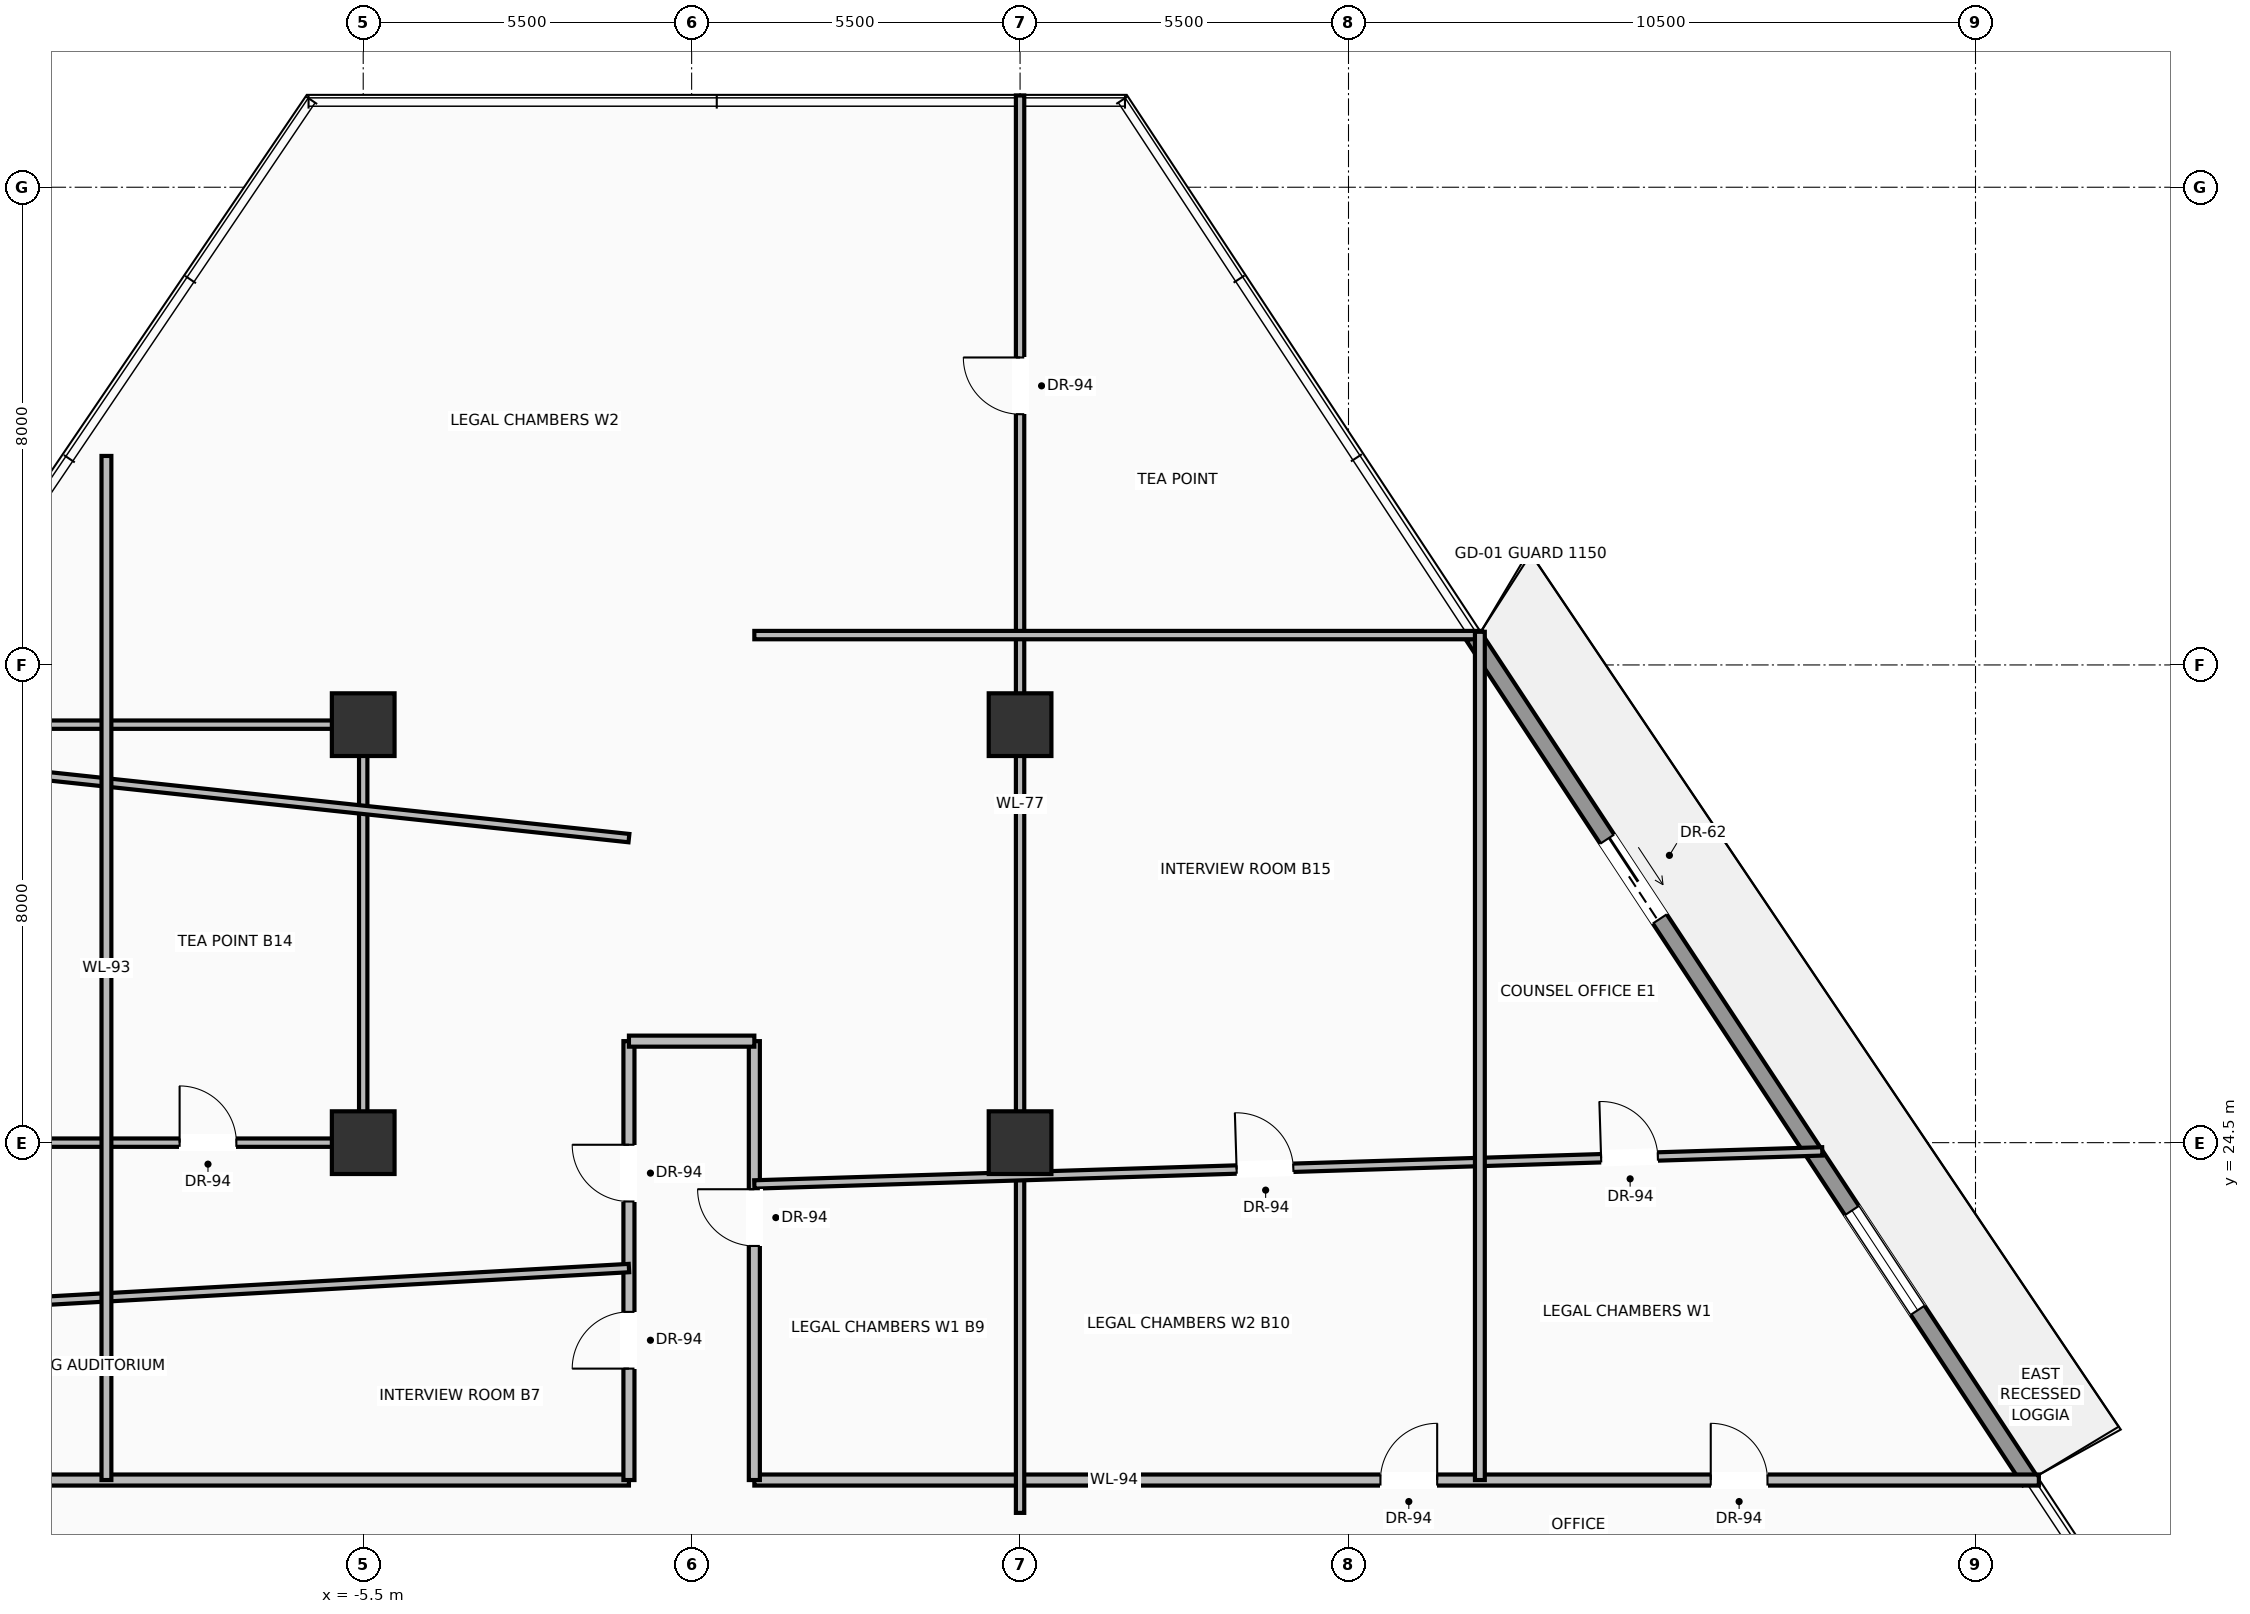
"""IFC4 building model, lengths in metres.
Left out: names, types, materials, properties, quantities, classifications, styles, units other than length and angle.
Written with IfcOpenShell. Run it as: python <this file> out.ifc"""

import sys

from ifc_helpers import new_model, si_unit, direction, frame, frame_2d, origin, origin_2d, place, context, subcontext, project, spatial, rectangle, extrude, source, transform, mapped, element, fill, save


model = new_model("IFC4")
c1 = context("Model", 3, precision=1e-05, world=origin(), true_north=direction((0.0, 1.0)))
c2 = subcontext(c1, "Body", "Model", "MODEL_VIEW")
j1 = project(units=[si_unit("LENGTHUNIT", "METRE"), si_unit("PLANEANGLEUNIT", "RADIAN")], contexts=[c1])
p1 = place(None, origin())
s1 = spatial("IfcSite", under=j1, at=p1, CompositionType="ELEMENT")
p2 = place(p1, origin())
s2 = spatial("IfcBuilding", under=s1, at=p2, CompositionType="ELEMENT")
p3 = place(p2, frame((0.0, 0.0, 68.2)))
s3 = spatial("IfcBuildingStorey", under=s2, at=p3, CompositionType="ELEMENT", Elevation=68.2)
m1 = source(origin(), c2, "Body", "SweptSolid", [
    extrude(rectangle(XDim=1.05, YDim=1.05, at=origin_2d()), origin(), (0.0, 0.0, 1.0), 3.7),
])
for number, where, z_axis, x_axis in (
    (1, (-5.5, 24.5, 0.0), (0.0, 0.0, 1.0), (1.0, 0.0, 0.0)),
    (2, (5.5, 24.5, 0.0), (0.0, 0.0, 1.0), (1.0, 0.0, 0.0)),
    (3, (-5.5, 31.5, 0.0), (0.0, 0.0, 1.0), (1.0, 0.0, 0.0)),
    (4, (5.5, 31.5, 0.0), (0.0, 0.0, 1.0), (1.0, 0.0, 0.0)),
):
    element("IfcColumn", number, at=place(p3, frame(where, z_axis=z_axis, x_axis=x_axis)), inside=s3, PredefinedType="COLUMN", context=c2, shape_type="MappedRepresentation", body=[
        mapped(m1, transform((0.0, 0.0, 0.0), scale=1.0)),
    ])
p4 = place(p3, frame((13.097, 32.975, 0.0), z_axis=(0.0, 0.0, 1.0), x_axis=(0.550258972905, -0.834994049522, 0.0)))
e5 = element("IfcWall", 5, at=p4, inside=s3, PredefinedType="SOLIDWALL", context=c2, shape_type="SweptSolid", body=[
    extrude(rectangle(XDim=16.927, YDim=0.28, at=frame_2d((8.464, 0.0))), origin(), (0.0, 0.0, 1.0), 2.98),
])
p5 = place(p4, frame((4.062, 0.0, 0.0)))
e6 = element("IfcOpeningElement", 6, at=p5, cuts=e5, PredefinedType="OPENING", context=c2, shape_type="SweptSolid", body=[
    extrude(rectangle(XDim=1.6, YDim=2.35, at=frame_2d((0.8, 1.175))), frame((0.0, 0.15, 0.0), z_axis=(0.0, -1.0, 0.0), x_axis=(1.0, 0.0, 0.0)), (0.0, 0.0, 1.0), 0.3),
])
p6 = place(p4, frame((11.511, 0.0, 0.9)))
e7 = element("IfcOpeningElement", 7, at=p6, cuts=e5, PredefinedType="OPENING", context=c2, shape_type="SweptSolid", body=[
    extrude(rectangle(XDim=2.0, YDim=1.85, at=frame_2d((1.0, 0.925))), frame((0.0, 0.15, 0.0), z_axis=(0.0, -1.0, 0.0), x_axis=(1.0, 0.0, 0.0)), (0.0, 0.0, 1.0), 0.3),
])
p7 = place(p3, frame((-22.184, 18.85, 0.0), z_axis=(0.0, 0.0, 1.0), x_axis=(1.0, 0.0, 0.0)))
e8 = element("IfcWall", 8, at=p7, inside=s3, PredefinedType="PARTITIONING", context=c2, shape_type="SweptSolid", body=[
    extrude(rectangle(XDim=21.134, YDim=0.185, at=frame_2d((10.567, 0.0))), origin(), (0.0, 0.0, 1.0), 2.697),
])
p8 = place(p7, frame((9.069, 0.0, 0.0)))
e9 = element("IfcOpeningElement", 9, at=p8, cuts=e8, PredefinedType="OPENING", context=c2, shape_type="SweptSolid", body=[
    extrude(rectangle(XDim=0.95, YDim=2.2, at=frame_2d((0.475, 1.1))), frame((0.0, 0.103, 0.0), z_axis=(0.0, -1.0, 0.0), x_axis=(1.0, 0.0, 0.0)), (0.0, 0.0, 1.0), 0.205),
])
p9 = place(p3, frame((1.05, 18.85, 0.0), z_axis=(0.0, 0.0, 1.0), x_axis=(1.0, 0.0, 0.0)))
e10 = element("IfcWall", 10, at=p9, inside=s3, PredefinedType="PARTITIONING", context=c2, shape_type="SweptSolid", body=[
    extrude(rectangle(XDim=21.511, YDim=0.185, at=frame_2d((10.756, 0.0))), origin(), (0.0, 0.0, 1.0), 2.697),
])
p10 = place(p9, frame((10.485, 0.0, 0.0)))
e11 = element("IfcOpeningElement", 11, at=p10, cuts=e10, PredefinedType="OPENING", context=c2, shape_type="SweptSolid", body=[
    extrude(rectangle(XDim=0.95, YDim=2.2, at=frame_2d((0.475, 1.1))), frame((0.0, 0.103, 0.0), z_axis=(0.0, -1.0, 0.0), x_axis=(1.0, 0.0, 0.0)), (0.0, 0.0, 1.0), 0.205),
])
p11 = place(p9, frame((16.016, 0.0, 0.0)))
e12 = element("IfcOpeningElement", 12, at=p11, cuts=e10, PredefinedType="OPENING", context=c2, shape_type="SweptSolid", body=[
    extrude(rectangle(XDim=0.95, YDim=2.2, at=frame_2d((0.475, 1.1))), frame((0.0, 0.103, 0.0), z_axis=(0.0, -1.0, 0.0), x_axis=(1.0, 0.0, 0.0)), (0.0, 0.0, 1.0), 0.205),
])
p12 = place(p3, frame((-1.05, 18.85, 0.0), z_axis=(0.0, 0.0, 1.0), x_axis=(0.0, 1.0, 0.0)))
e13 = element("IfcWall", 13, at=p12, inside=s3, PredefinedType="PARTITIONING", context=c2, shape_type="SweptSolid", body=[
    extrude(rectangle(XDim=7.35, YDim=0.185, at=frame_2d((3.675, 0.0))), origin(), (0.0, 0.0, 1.0), 2.697),
])
p13 = place(p12, frame((1.866, 0.0, 0.0)))
e14 = element("IfcOpeningElement", 14, at=p13, cuts=e13, PredefinedType="OPENING", context=c2, shape_type="SweptSolid", body=[
    extrude(rectangle(XDim=0.95, YDim=2.2, at=frame_2d((0.475, 1.1))), frame((0.0, 0.103, 0.0), z_axis=(0.0, -1.0, 0.0), x_axis=(1.0, 0.0, 0.0)), (0.0, 0.0, 1.0), 0.205),
])
p14 = place(p12, frame((4.665, 0.0, 0.0)))
e15 = element("IfcOpeningElement", 15, at=p14, cuts=e13, PredefinedType="OPENING", context=c2, shape_type="SweptSolid", body=[
    extrude(rectangle(XDim=0.95, YDim=2.2, at=frame_2d((0.475, 1.1))), frame((0.0, 0.103, 0.0), z_axis=(0.0, -1.0, 0.0), x_axis=(1.0, 0.0, 0.0)), (0.0, 0.0, 1.0), 0.205),
])
p15 = place(p3, frame((1.05, 18.85, 0.0), z_axis=(0.0, 0.0, 1.0), x_axis=(0.0, 1.0, 0.0)))
e16 = element("IfcWall", 16, at=p15, inside=s3, PredefinedType="PARTITIONING", context=c2, shape_type="SweptSolid", body=[
    extrude(rectangle(XDim=7.35, YDim=0.185, at=frame_2d((3.675, 0.0))), origin(), (0.0, 0.0, 1.0), 2.697),
])
p16 = place(p15, frame((3.92, 0.0, 0.0)))
e17 = element("IfcOpeningElement", 17, at=p16, cuts=e16, PredefinedType="OPENING", context=c2, shape_type="SweptSolid", body=[
    extrude(rectangle(XDim=0.95, YDim=2.2, at=frame_2d((0.475, 1.1))), frame((0.0, 0.103, 0.0), z_axis=(0.0, -1.0, 0.0), x_axis=(1.0, 0.0, 0.0)), (0.0, 0.0, 1.0), 0.205),
])
p17 = place(p3, frame((-1.05, 26.2, 0.0), z_axis=(0.0, 0.0, 1.0), x_axis=(1.0, 0.0, 0.0)))
e18 = element("IfcWall", 18, at=p17, inside=s3, PredefinedType="PARTITIONING", context=c2, shape_type="SweptSolid", body=[
    extrude(rectangle(XDim=2.1, YDim=0.185, at=frame_2d((1.05, 0.0))), origin(), (0.0, 0.0, 1.0), 3.392),
])
p18 = place(p3, frame((5.5, 18.3, 0.0), z_axis=(0.0, 0.0, 1.0), x_axis=(0.0, 1.0, 0.0)))
e19 = element("IfcWall", 19, at=p18, inside=s3, PredefinedType="PARTITIONING", context=c2, shape_type="SweptSolid", body=[
    extrude(rectangle(XDim=23.737, YDim=0.14, at=frame_2d((11.868, 0.0))), origin(), (0.0, 0.0, 1.0), 2.697),
])
p19 = place(p18, frame((18.399, 0.0, 0.0)))
e20 = element("IfcOpeningElement", 20, at=p19, cuts=e19, PredefinedType="OPENING", context=c2, shape_type="SweptSolid", body=[
    extrude(rectangle(XDim=0.95, YDim=2.2, at=frame_2d((0.475, 1.1))), frame((0.0, 0.08, 0.0), z_axis=(0.0, -1.0, 0.0), x_axis=(1.0, 0.0, 0.0)), (0.0, 0.0, 1.0), 0.16),
])
p20 = place(p3, frame((-18.347, 24.5, 0.0), z_axis=(0.0, 0.0, 1.0), x_axis=(1.0, 0.0, 0.0)))
e21 = element("IfcWall", 21, at=p20, inside=s3, PredefinedType="PARTITIONING", context=c2, shape_type="SweptSolid", body=[
    extrude(rectangle(XDim=12.847, YDim=0.14, at=frame_2d((6.424, 0.0))), origin(), (0.0, 0.0, 1.0), 2.697),
])
p21 = place(p20, frame((4.05, 0.0, 0.0)))
e22 = element("IfcOpeningElement", 22, at=p21, cuts=e21, PredefinedType="OPENING", context=c2, shape_type="SweptSolid", body=[
    extrude(rectangle(XDim=0.95, YDim=2.2, at=frame_2d((0.475, 1.1))), frame((0.0, 0.08, 0.0), z_axis=(0.0, -1.0, 0.0), x_axis=(1.0, 0.0, 0.0)), (0.0, 0.0, 1.0), 0.16),
])
p22 = place(p20, frame((9.773, 0.0, 0.0)))
e23 = element("IfcOpeningElement", 23, at=p22, cuts=e21, PredefinedType="OPENING", context=c2, shape_type="SweptSolid", body=[
    extrude(rectangle(XDim=0.95, YDim=2.2, at=frame_2d((0.475, 1.1))), frame((0.0, 0.08, 0.0), z_axis=(0.0, -1.0, 0.0), x_axis=(1.0, 0.0, 0.0)), (0.0, 0.0, 1.0), 0.16),
])
p23 = place(p3, frame((-5.5, 24.5, 0.0), z_axis=(0.0, 0.0, 1.0), x_axis=(0.0, 1.0, 0.0)))
e24 = element("IfcWall", 24, at=p23, inside=s3, PredefinedType="PARTITIONING", context=c2, shape_type="SweptSolid", body=[
    extrude(rectangle(XDim=7.0, YDim=0.14, at=frame_2d((3.5, 0.0))), origin(), (0.0, 0.0, 1.0), 2.697),
])
p24 = place(p3, frame((-13.594, 31.5, 0.0), z_axis=(0.0, 0.0, 1.0), x_axis=(1.0, 0.0, 0.0)))
e25 = element("IfcWall", 25, at=p24, inside=s3, PredefinedType="PARTITIONING", context=c2, shape_type="SweptSolid", body=[
    extrude(rectangle(XDim=8.094, YDim=0.14, at=frame_2d((4.047, 0.0))), origin(), (0.0, 0.0, 1.0), 2.697),
])
p25 = place(p3, frame((-20.515, 21.308, 0.0), z_axis=(0.0, 0.0, 1.0), x_axis=(0.998430618399, 0.056002680683, 0.0)))
e26 = element("IfcWall", 26, at=p25, inside=s3, PredefinedType="PARTITIONING", context=c2, shape_type="SweptSolid", body=[
    extrude(rectangle(XDim=19.495, YDim=0.14, at=frame_2d((9.748, 0.0))), origin(), (0.0, 0.0, 1.0), 2.697),
])
p26 = place(p25, frame((5.195, 0.0, 0.0)))
e27 = element("IfcOpeningElement", 27, at=p26, cuts=e26, PredefinedType="OPENING", context=c2, shape_type="SweptSolid", body=[
    extrude(rectangle(XDim=0.95, YDim=2.2, at=frame_2d((0.475, 1.1))), frame((0.0, 0.08, 0.0), z_axis=(0.0, -1.0, 0.0), x_axis=(1.0, 0.0, 0.0)), (0.0, 0.0, 1.0), 0.16),
])
p27 = place(p3, frame((-13.951, 30.975, 0.0), z_axis=(0.0, 0.0, 1.0), x_axis=(0.994372265015, -0.105942430446, 0.0)))
e28 = element("IfcWall", 28, at=p27, inside=s3, PredefinedType="PARTITIONING", context=c2, shape_type="SweptSolid", body=[
    extrude(rectangle(XDim=12.974, YDim=0.14, at=frame_2d((6.487, 0.0))), origin(), (0.0, 0.0, 1.0), 2.697),
])
p28 = place(p3, frame((1.05, 23.8, 0.0), z_axis=(0.0, 0.0, 1.0), x_axis=(0.99952105976, 0.030945938291, 0.0)))
e29 = element("IfcWall", 29, at=p28, inside=s3, PredefinedType="PARTITIONING", context=c2, shape_type="SweptSolid", body=[
    extrude(rectangle(XDim=17.893, YDim=0.14, at=frame_2d((8.946, 0.0))), origin(), (0.0, 0.0, 1.0), 2.697),
])
p29 = place(p28, frame((8.08, 0.0, 0.0)))
e30 = element("IfcOpeningElement", 30, at=p29, cuts=e29, PredefinedType="OPENING", context=c2, shape_type="SweptSolid", body=[
    extrude(rectangle(XDim=0.95, YDim=2.2, at=frame_2d((0.475, 1.1))), frame((0.0, 0.08, 0.0), z_axis=(0.0, -1.0, 0.0), x_axis=(1.0, 0.0, 0.0)), (0.0, 0.0, 1.0), 0.16),
])
p30 = place(p28, frame((14.187, 0.0, 0.0)))
e31 = element("IfcOpeningElement", 31, at=p30, cuts=e29, PredefinedType="OPENING", context=c2, shape_type="SweptSolid", body=[
    extrude(rectangle(XDim=0.95, YDim=2.2, at=frame_2d((0.475, 1.1))), frame((0.0, 0.08, 0.0), z_axis=(0.0, -1.0, 0.0), x_axis=(1.0, 0.0, 0.0)), (0.0, 0.0, 1.0), 0.16),
])
p31 = place(p3, frame((1.05, 33.0, 0.0), z_axis=(0.0, 0.0, 1.0), x_axis=(1.0, 0.0, 0.0)))
e32 = element("IfcWall", 32, at=p31, inside=s3, PredefinedType="PARTITIONING", context=c2, shape_type="SweptSolid", body=[
    extrude(rectangle(XDim=12.187, YDim=0.14, at=frame_2d((6.093, 0.0))), origin(), (0.0, 0.0, 1.0), 2.697),
])
p32 = place(p3, frame((-9.8, 18.85, 0.0), z_axis=(0.0, 0.0, 1.0), x_axis=(0.0, 1.0, 0.0)))
e33 = element("IfcWall", 33, at=p32, inside=s3, PredefinedType="PARTITIONING", context=c2, shape_type="SweptSolid", body=[
    extrude(rectangle(XDim=17.15, YDim=0.165, at=frame_2d((8.575, 0.0))), origin(), (0.0, 0.0, 1.0), 2.697),
])
p33 = place(p3, frame((13.2, 18.85, 0.0), z_axis=(0.0, 0.0, 1.0), x_axis=(0.0, 1.0, 0.0)))
e34 = element("IfcWall", 34, at=p33, inside=s3, PredefinedType="PARTITIONING", context=c2, shape_type="SweptSolid", body=[
    extrude(rectangle(XDim=14.205, YDim=0.165, at=frame_2d((7.103, 0.0))), origin(), (0.0, 0.0, 1.0), 2.697),
])
m2 = source(origin(), c2, "Body", "SweptSolid", [
    extrude(rectangle(XDim=1.6, YDim=2.35, at=frame_2d((0.8, 1.175))), frame((0.0, 0.025, 0.0), z_axis=(0.0, -1.0, 0.0), x_axis=(1.0, 0.0, 0.0)), (0.0, 0.0, 1.0), 0.05),
])
p34 = place(p5, origin())
e35 = element("IfcDoor", 35, at=p34, inside=s3, OperationType="SLIDING_TO_RIGHT", PredefinedType="DOOR", context=c2, shape_type="MappedRepresentation", body=[
    mapped(m2, transform((0.0, 0.0, 0.0), scale=1.0)),
])
fill(e6, e35)
m3 = source(origin(), c2, "Body", "SweptSolid", [
    extrude(rectangle(XDim=2.0, YDim=1.85, at=frame_2d((1.0, 0.925))), frame((0.0, 0.03, 0.0), z_axis=(0.0, -1.0, 0.0), x_axis=(1.0, 0.0, 0.0)), (0.0, 0.0, 1.0), 0.06),
])
p35 = place(p6, origin())
e36 = element("IfcWindow", 36, at=p35, inside=s3, PartitioningType="SINGLE_PANEL", PredefinedType="WINDOW", context=c2, shape_type="MappedRepresentation", body=[
    mapped(m3, transform((0.0, 0.0, 0.0), scale=1.0)),
])
fill(e7, e36)
m4 = source(origin(), c2, "Body", "SweptSolid", [
    extrude(rectangle(XDim=0.95, YDim=2.2, at=frame_2d((0.475, 1.1))), frame((0.0, 0.025, 0.0), z_axis=(0.0, -1.0, 0.0), x_axis=(1.0, 0.0, 0.0)), (0.0, 0.0, 1.0), 0.05),
])
p36 = place(p10, origin())
e37 = element("IfcDoor", 37, at=p36, inside=s3, OperationType="SINGLE_SWING_RIGHT", PredefinedType="DOOR", context=c2, shape_type="MappedRepresentation", body=[
    mapped(m4, transform((0.0, 0.0, 0.0), scale=1.0)),
])
fill(e11, e37)
p37 = place(p13, origin())
e38 = element("IfcDoor", 38, at=p37, inside=s3, OperationType="SINGLE_SWING_LEFT", PredefinedType="DOOR", context=c2, shape_type="MappedRepresentation", body=[
    mapped(m4, transform((0.0, 0.0, 0.0), scale=1.0)),
])
fill(e14, e38)
p38 = place(p16, origin())
e39 = element("IfcDoor", 39, at=p38, inside=s3, OperationType="SINGLE_SWING_RIGHT", PredefinedType="DOOR", context=c2, shape_type="MappedRepresentation", body=[
    mapped(m4, transform((0.0, 0.0, 0.0), scale=1.0)),
])
fill(e17, e39)
p39 = place(p11, origin())
e40 = element("IfcDoor", 40, at=p39, inside=s3, OperationType="SINGLE_SWING_LEFT", PredefinedType="DOOR", context=c2, shape_type="MappedRepresentation", body=[
    mapped(m4, transform((0.0, 0.0, 0.0), scale=1.0)),
])
fill(e12, e40)
p40 = place(p29, origin())
e41 = element("IfcDoor", 41, at=p40, inside=s3, OperationType="SINGLE_SWING_LEFT", PredefinedType="DOOR", context=c2, shape_type="MappedRepresentation", body=[
    mapped(m4, transform((0.0, 0.0, 0.0), scale=1.0)),
])
fill(e30, e41)
p41 = place(p14, origin())
e42 = element("IfcDoor", 42, at=p41, inside=s3, OperationType="SINGLE_SWING_RIGHT", PredefinedType="DOOR", context=c2, shape_type="MappedRepresentation", body=[
    mapped(m4, transform((0.0, 0.0, 0.0), scale=1.0)),
])
fill(e15, e42)
p42 = place(p30, origin())
e43 = element("IfcDoor", 43, at=p42, inside=s3, OperationType="SINGLE_SWING_LEFT", PredefinedType="DOOR", context=c2, shape_type="MappedRepresentation", body=[
    mapped(m4, transform((0.0, 0.0, 0.0), scale=1.0)),
])
fill(e31, e43)
p43 = place(p22, origin())
e44 = element("IfcDoor", 44, at=p43, inside=s3, OperationType="SINGLE_SWING_LEFT", PredefinedType="DOOR", context=c2, shape_type="MappedRepresentation", body=[
    mapped(m4, transform((0.0, 0.0, 0.0), scale=1.0)),
])
fill(e23, e44)
p44 = place(p19, origin())
e45 = element("IfcDoor", 45, at=p44, inside=s3, OperationType="SINGLE_SWING_RIGHT", PredefinedType="DOOR", context=c2, shape_type="MappedRepresentation", body=[
    mapped(m4, transform((0.0, 0.0, 0.0), scale=1.0)),
])
fill(e20, e45)
save(model, sys.argv[1])
